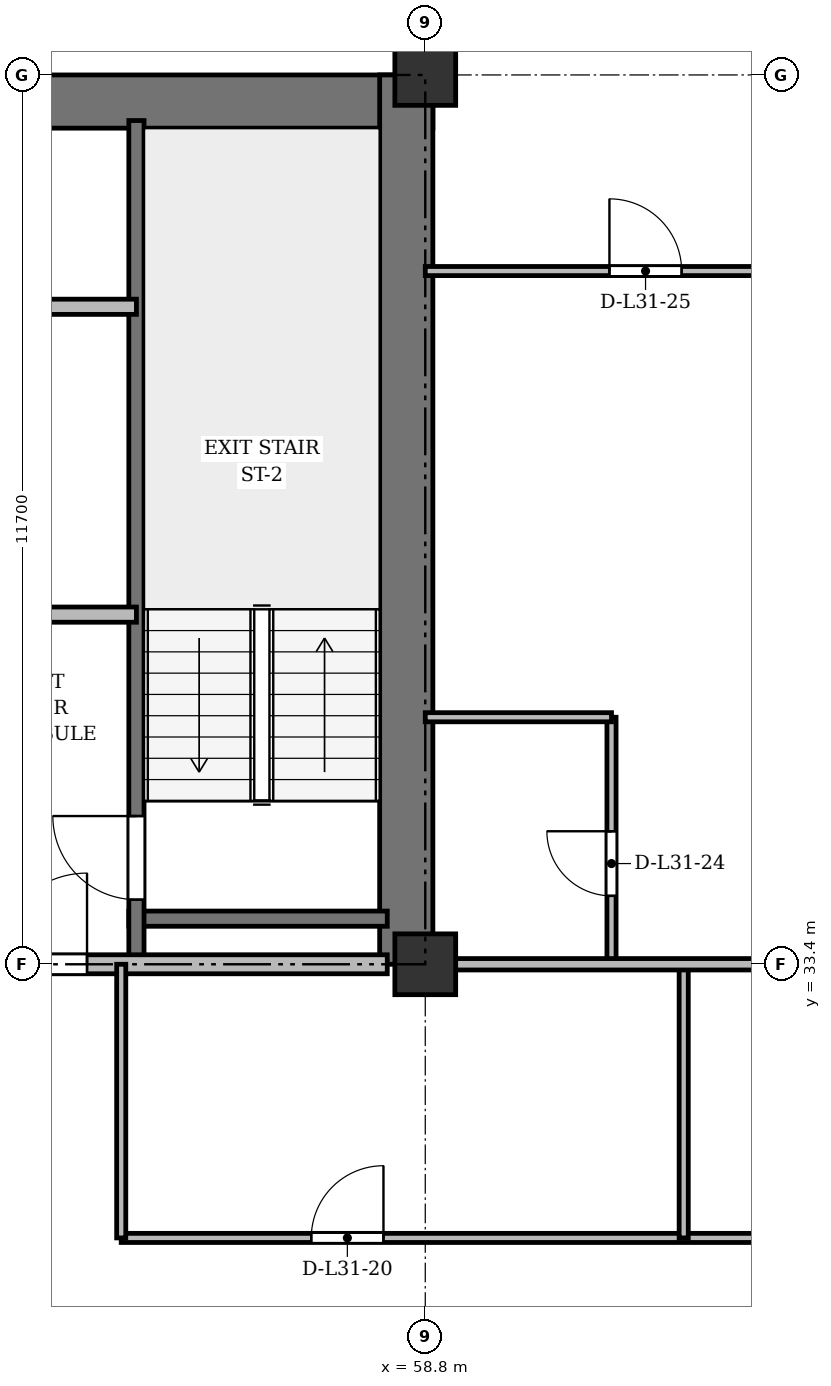
"""IFC4 building model, lengths in metres.
Left out: names, types, materials, properties, quantities, classifications, styles, units other than length and angle.
Written with IfcOpenShell. Run it as: python <this file> out.ifc"""

import sys

from ifc_helpers import new_model, si_unit, direction, frame, frame_2d, origin, origin_2d, place, context, subcontext, project, spatial, rectangle, extrude, source, transform, mapped, element, fill, save


model = new_model("IFC4")
c1 = context("Model", 3, precision=1e-05, world=origin(), true_north=direction((0.0, 1.0)))
c2 = subcontext(c1, "Body", "Model", "MODEL_VIEW")
j1 = project(units=[si_unit("LENGTHUNIT", "METRE"), si_unit("PLANEANGLEUNIT", "RADIAN")], contexts=[c1])
p1 = place(None, origin())
s1 = spatial("IfcSite", under=j1, at=p1, CompositionType="ELEMENT")
p2 = place(p1, origin())
s2 = spatial("IfcBuilding", under=s1, at=p2, CompositionType="ELEMENT")
p3 = place(p2, frame((0.0, 0.0, 121.3)))
s3 = spatial("IfcBuildingStorey", under=s2, at=p3, CompositionType="ELEMENT", Elevation=121.3)
m1 = source(origin(), c2, "Body", "SweptSolid", [
    extrude(rectangle(XDim=0.8, YDim=0.8, at=origin_2d()), origin(), (0.0, 0.0, 1.0), 3.6),
])
for number, where, z_axis, x_axis in (
    (1, (58.8, 33.4, 0.0), (0.0, 0.0, 1.0), (1.0, 0.0, 0.0)),
    (2, (58.8, 45.1, 0.0), (0.0, 0.0, 1.0), (1.0, 0.0, 0.0)),
):
    element("IfcColumn", number, at=place(p3, frame(where, z_axis=z_axis, x_axis=x_axis)), inside=s3, PredefinedType="COLUMN", context=c2, shape_type="MappedRepresentation", body=[
        mapped(m1, transform((0.0, 0.0, 0.0), x_axis=(1.0, 0.0, 0.0), y_axis=(0.0, 1.0, 0.0), z_axis=(0.0, 0.0, 1.0), scale=1.0)),
    ])
p4 = place(p3, frame((15.5, 44.75, 0.0), z_axis=(0.0, 0.0, 1.0), x_axis=(1.0, 0.0, 0.0)))
e3 = element("IfcWall", 3, at=p4, inside=s3, PredefinedType="SHEAR", context=c2, shape_type="SweptSolid", body=[
    extrude(rectangle(XDim=43.4, YDim=0.7, at=frame_2d((21.7, 0.0))), origin(), (0.0, 0.0, 1.0), 3.34),
])
p5 = place(p3, frame((58.55, 33.4, 0.0), z_axis=(0.0, 0.0, 1.0), x_axis=(0.0, 1.0, 0.0)))
e4 = element("IfcWall", 4, at=p5, inside=s3, PredefinedType="SHEAR", context=c2, shape_type="SweptSolid", body=[
    extrude(rectangle(XDim=11.7, YDim=0.7, at=frame_2d((5.85, 0.0))), origin(), (0.0, 0.0, 1.0), 3.34),
])
p6 = place(p3, frame((54.9, 34.0, 0.0), z_axis=(0.0, 0.0, 1.0), x_axis=(1.0, 0.0, 0.0)))
e5 = element("IfcWall", 5, at=p6, inside=s3, PredefinedType="SHEAR", context=c2, shape_type="SweptSolid", body=[
    extrude(rectangle(XDim=3.4, YDim=0.2, at=frame_2d((1.7, 0.0))), origin(), (0.0, 0.0, 1.0), 3.34),
])
p7 = place(p3, frame((55.0, 33.4, 0.0), z_axis=(0.0, 0.0, 1.0), x_axis=(0.0, 1.0, 0.0)))
e6 = element("IfcWall", 6, at=p7, inside=s3, PredefinedType="SHEAR", context=c2, shape_type="SweptSolid", body=[
    extrude(rectangle(XDim=11.1, YDim=0.2, at=frame_2d((5.55, 0.0))), origin(), (0.0, 0.0, 1.0), 3.34),
])
p8 = place(p7, frame((0.85, 0.0, 0.0)))
e7 = element("IfcOpeningElement", 7, at=p8, cuts=e6, PredefinedType="OPENING", context=c2, shape_type="SweptSolid", body=[
    extrude(rectangle(XDim=1.1, YDim=2.15, at=frame_2d((0.55, 1.075))), frame((0.0, 0.11, 0.0), z_axis=(0.0, -1.0, 0.0), x_axis=(1.0, 0.0, 0.0)), (0.0, 0.0, 1.0), 0.22),
])
p9 = place(p3, frame((47.15, 42.05, 0.0), z_axis=(0.0, 0.0, 1.0), x_axis=(1.0, 0.0, 0.0)))
e8 = element("IfcWall", 8, at=p9, inside=s3, PredefinedType="SOLIDWALL", context=c2, shape_type="SweptSolid", body=[
    extrude(rectangle(XDim=7.85, YDim=0.2, at=frame_2d((3.925, 0.0))), origin(), (0.0, 0.0, 1.0), 2.84),
])
p10 = place(p9, frame((0.75, 0.0, 0.0)))
e9 = element("IfcOpeningElement", 9, at=p10, cuts=e8, PredefinedType="OPENING", context=c2, shape_type="SweptSolid", body=[
    extrude(rectangle(XDim=0.9, YDim=2.1, at=frame_2d((0.45, 1.05))), frame((0.0, 0.11, 0.0), z_axis=(0.0, -1.0, 0.0), x_axis=(1.0, 0.0, 0.0)), (0.0, 0.0, 1.0), 0.22),
])
p11 = place(p9, frame((3.85, 0.0, 0.0)))
e10 = element("IfcOpeningElement", 10, at=p11, cuts=e8, PredefinedType="OPENING", context=c2, shape_type="SweptSolid", body=[
    extrude(rectangle(XDim=0.9, YDim=2.1, at=frame_2d((0.45, 1.05))), frame((0.0, 0.11, 0.0), z_axis=(0.0, -1.0, 0.0), x_axis=(1.0, 0.0, 0.0)), (0.0, 0.0, 1.0), 0.22),
])
p12 = place(p3, frame((52.45, 38.0, 0.0), z_axis=(0.0, 0.0, 1.0), x_axis=(1.0, 0.0, 0.0)))
e11 = element("IfcWall", 11, at=p12, inside=s3, PredefinedType="PARTITIONING", context=c2, shape_type="SweptSolid", body=[
    extrude(rectangle(XDim=2.55, YDim=0.2, at=frame_2d((1.275, 0.0))), origin(), (0.0, 0.0, 1.0), 3.34),
])
p13 = place(p3, frame((47.15, 33.4, 0.0), z_axis=(0.0, 0.0, 1.0), x_axis=(1.0, 0.0, 0.0)))
e12 = element("IfcWall", 12, at=p13, inside=s3, PredefinedType="PARTITIONING", context=c2, shape_type="SweptSolid", body=[
    extrude(rectangle(XDim=11.15, YDim=0.25, at=frame_2d((5.575, 0.0))), origin(), (0.0, 0.0, 1.0), 2.752),
])
p14 = place(p13, frame((0.7, 0.0, 0.0)))
e13 = element("IfcOpeningElement", 13, at=p14, cuts=e12, PredefinedType="OPENING", context=c2, shape_type="SweptSolid", body=[
    extrude(rectangle(XDim=0.95, YDim=2.15, at=frame_2d((0.475, 1.075))), frame((0.0, 0.135, 0.0), z_axis=(0.0, -1.0, 0.0), x_axis=(1.0, 0.0, 0.0)), (0.0, 0.0, 1.0), 0.27),
])
p15 = place(p13, frame((6.0, 0.0, 0.0)))
e14 = element("IfcOpeningElement", 14, at=p15, cuts=e12, PredefinedType="OPENING", context=c2, shape_type="SweptSolid", body=[
    extrude(rectangle(XDim=1.2, YDim=2.15, at=frame_2d((0.6, 1.075))), frame((0.0, 0.135, 0.0), z_axis=(0.0, -1.0, 0.0), x_axis=(1.0, 0.0, 0.0)), (0.0, 0.0, 1.0), 0.27),
])
p16 = place(p3, frame((54.8, 29.8, 0.0), z_axis=(0.0, 0.0, 1.0), x_axis=(1.0, 0.0, 0.0)))
e15 = element("IfcWall", 15, at=p16, inside=s3, PredefinedType="PARTITIONING", context=c2, shape_type="SweptSolid", body=[
    extrude(rectangle(XDim=14.85, YDim=0.12, at=frame_2d((7.425, 0.0))), origin(), (0.0, 0.0, 1.0), 2.84),
])
p17 = place(p16, frame((2.5, 0.0, 0.0)))
e16 = element("IfcOpeningElement", 16, at=p17, cuts=e15, PredefinedType="OPENING", context=c2, shape_type="SweptSolid", body=[
    extrude(rectangle(XDim=0.95, YDim=2.15, at=frame_2d((0.475, 1.075))), frame((0.0, 0.07, 0.0), z_axis=(0.0, -1.0, 0.0), x_axis=(1.0, 0.0, 0.0)), (0.0, 0.0, 1.0), 0.14),
])
p18 = place(p16, frame((9.2, 0.0, 0.0)))
e17 = element("IfcOpeningElement", 17, at=p18, cuts=e15, PredefinedType="OPENING", context=c2, shape_type="SweptSolid", body=[
    extrude(rectangle(XDim=0.95, YDim=2.15, at=frame_2d((0.475, 1.075))), frame((0.0, 0.07, 0.0), z_axis=(0.0, -1.0, 0.0), x_axis=(1.0, 0.0, 0.0)), (0.0, 0.0, 1.0), 0.14),
])
for number, where, z_axis, x_axis in (
    (18, (62.2, 29.8, 0.0), (0.0, 0.0, 1.0), (0.0, 1.0, 0.0)),
    (19, (54.8, 29.8, 0.0), (0.0, 0.0, 1.0), (0.0, 1.0, 0.0)),
):
    element("IfcWall", number, at=place(p3, frame(where, z_axis=z_axis, x_axis=x_axis)), inside=s3, PredefinedType="PARTITIONING", context=c2, shape_type="SweptSolid", body=[
        extrude(rectangle(XDim=3.6, YDim=0.12, at=frame_2d((1.8, 0.0))), origin(), (0.0, 0.0, 1.0), 2.752),
    ])
p19 = place(p3, frame((61.25, 33.4, 0.0), z_axis=(0.0, 0.0, 1.0), x_axis=(0.0, 1.0, 0.0)))
e20 = element("IfcWall", 20, at=p19, inside=s3, PredefinedType="PARTITIONING", context=c2, shape_type="SweptSolid", body=[
    extrude(rectangle(XDim=3.25, YDim=0.12, at=frame_2d((1.625, 0.0))), origin(), (0.0, 0.0, 1.0), 2.752),
])
p20 = place(p19, frame((0.9, 0.0, 0.0)))
e21 = element("IfcOpeningElement", 21, at=p20, cuts=e20, PredefinedType="OPENING", context=c2, shape_type="SweptSolid", body=[
    extrude(rectangle(XDim=0.85, YDim=2.1, at=frame_2d((0.425, 1.05))), frame((0.0, 0.07, 0.0), z_axis=(0.0, -1.0, 0.0), x_axis=(1.0, 0.0, 0.0)), (0.0, 0.0, 1.0), 0.14),
])
p21 = place(p3, frame((58.8, 36.65, 0.0), z_axis=(0.0, 0.0, 1.0), x_axis=(1.0, 0.0, 0.0)))
e22 = element("IfcWall", 22, at=p21, inside=s3, PredefinedType="PARTITIONING", context=c2, shape_type="SweptSolid", body=[
    extrude(rectangle(XDim=2.45, YDim=0.12, at=frame_2d((1.225, 0.0))), origin(), (0.0, 0.0, 1.0), 2.84),
])
p22 = place(p3, frame((58.8, 42.52, 0.0), z_axis=(0.0, 0.0, 1.0), x_axis=(1.0, 0.0, 0.0)))
e23 = element("IfcWall", 23, at=p22, inside=s3, PredefinedType="PARTITIONING", context=c2, shape_type="SweptSolid", body=[
    extrude(rectangle(XDim=5.425, YDim=0.12, at=frame_2d((2.712, 0.0))), origin(), (0.0, 0.0, 1.0), 2.84),
])
p23 = place(p22, frame((2.423, 0.0, 0.0)))
e24 = element("IfcOpeningElement", 24, at=p23, cuts=e23, PredefinedType="OPENING", context=c2, shape_type="SweptSolid", body=[
    extrude(rectangle(XDim=0.95, YDim=2.15, at=frame_2d((0.475, 1.075))), frame((0.0, 0.07, 0.0), z_axis=(0.0, -1.0, 0.0), x_axis=(1.0, 0.0, 0.0)), (0.0, 0.0, 1.0), 0.14),
])
p24 = place(p3, frame((58.8, 33.4, 0.0), z_axis=(0.0, 0.0, 1.0), x_axis=(1.0, 0.0, 0.0)))
e25 = element("IfcWall", 25, at=p24, inside=s3, PredefinedType="PARTITIONING", context=c2, shape_type="SweptSolid", body=[
    extrude(rectangle(XDim=10.85, YDim=0.15, at=frame_2d((5.425, 0.0))), origin(), (0.0, 0.0, 1.0), 2.752),
])
p25 = place(p24, frame((4.933, 0.0, 0.0)))
e26 = element("IfcOpeningElement", 26, at=p25, cuts=e25, PredefinedType="OPENING", context=c2, shape_type="SweptSolid", body=[
    extrude(rectangle(XDim=0.95, YDim=2.15, at=frame_2d((0.475, 1.075))), frame((0.0, 0.085, 0.0), z_axis=(0.0, -1.0, 0.0), x_axis=(1.0, 0.0, 0.0)), (0.0, 0.0, 1.0), 0.17),
])
p26 = place(p3, frame((58.8, 44.75, 0.0), z_axis=(0.0, 0.0, 1.0), x_axis=(0.0, 1.0, 0.0)))
e27 = element("IfcWall", 27, at=p26, inside=s3, PredefinedType="PARTITIONING", context=c2, shape_type="SweptSolid", body=[
    extrude(rectangle(XDim=3.61, YDim=0.15, at=frame_2d((1.805, 0.0))), origin(), (0.0, 0.0, 1.0), 2.84),
])
p27 = place(p26, frame((1.1, 0.0, 0.0)))
e28 = element("IfcOpeningElement", 28, at=p27, cuts=e27, PredefinedType="OPENING", context=c2, shape_type="SweptSolid", body=[
    extrude(rectangle(XDim=0.95, YDim=2.15, at=frame_2d((0.475, 1.075))), frame((0.0, 0.085, 0.0), z_axis=(0.0, -1.0, 0.0), x_axis=(1.0, 0.0, 0.0)), (0.0, 0.0, 1.0), 0.17),
])
m2 = source(origin(), c2, "Body", "SweptSolid", [
    extrude(rectangle(XDim=1.1, YDim=2.15, at=frame_2d((0.55, 1.075))), frame((0.0, 0.025, 0.0), z_axis=(0.0, -1.0, 0.0), x_axis=(1.0, 0.0, 0.0)), (0.0, 0.0, 1.0), 0.05),
])
p28 = place(p8, origin())
e29 = element("IfcDoor", 29, at=p28, inside=s3, OperationType="SINGLE_SWING_RIGHT", PredefinedType="DOOR", context=c2, shape_type="MappedRepresentation", body=[
    mapped(m2, transform((0.0, 0.0, 0.0), x_axis=(1.0, 0.0, 0.0), y_axis=(0.0, 1.0, 0.0), z_axis=(0.0, 0.0, 1.0), scale=1.0)),
])
fill(e7, e29)
m3 = source(origin(), c2, "Body", "SweptSolid", [
    extrude(rectangle(XDim=1.2, YDim=2.15, at=frame_2d((0.6, 1.075))), frame((0.0, 0.025, 0.0), z_axis=(0.0, -1.0, 0.0), x_axis=(1.0, 0.0, 0.0)), (0.0, 0.0, 1.0), 0.05),
])
p29 = place(p15, origin())
e30 = element("IfcDoor", 30, at=p29, inside=s3, OperationType="SINGLE_SWING_RIGHT", PredefinedType="DOOR", context=c2, shape_type="MappedRepresentation", body=[
    mapped(m3, transform((0.0, 0.0, 0.0), x_axis=(1.0, 0.0, 0.0), y_axis=(0.0, 1.0, 0.0), z_axis=(0.0, 0.0, 1.0), scale=1.0)),
])
fill(e14, e30)
m4 = source(origin(), c2, "Body", "SweptSolid", [
    extrude(rectangle(XDim=0.95, YDim=2.15, at=frame_2d((0.475, 1.075))), frame((0.0, 0.025, 0.0), z_axis=(0.0, -1.0, 0.0), x_axis=(1.0, 0.0, 0.0)), (0.0, 0.0, 1.0), 0.05),
])
p30 = place(p17, origin())
e31 = element("IfcDoor", 31, at=p30, inside=s3, OperationType="SINGLE_SWING_RIGHT", PredefinedType="DOOR", context=c2, shape_type="MappedRepresentation", body=[
    mapped(m4, transform((0.0, 0.0, 0.0), x_axis=(1.0, 0.0, 0.0), y_axis=(0.0, 1.0, 0.0), z_axis=(0.0, 0.0, 1.0), scale=1.0)),
])
fill(e16, e31)
m5 = source(origin(), c2, "Body", "SweptSolid", [
    extrude(rectangle(XDim=0.85, YDim=2.1, at=frame_2d((0.425, 1.05))), frame((0.0, 0.025, 0.0), z_axis=(0.0, -1.0, 0.0), x_axis=(1.0, 0.0, 0.0)), (0.0, 0.0, 1.0), 0.05),
])
p31 = place(p20, origin())
e32 = element("IfcDoor", 32, at=p31, inside=s3, OperationType="SINGLE_SWING_RIGHT", PredefinedType="DOOR", context=c2, shape_type="MappedRepresentation", body=[
    mapped(m5, transform((0.0, 0.0, 0.0), x_axis=(1.0, 0.0, 0.0), y_axis=(0.0, 1.0, 0.0), z_axis=(0.0, 0.0, 1.0), scale=1.0)),
])
fill(e21, e32)
p32 = place(p23, origin())
e33 = element("IfcDoor", 33, at=p32, inside=s3, OperationType="SINGLE_SWING_LEFT", PredefinedType="DOOR", context=c2, shape_type="MappedRepresentation", body=[
    mapped(m4, transform((0.0, 0.0, 0.0), x_axis=(1.0, 0.0, 0.0), y_axis=(0.0, 1.0, 0.0), z_axis=(0.0, 0.0, 1.0), scale=1.0)),
])
fill(e24, e33)
save(model, sys.argv[1])
